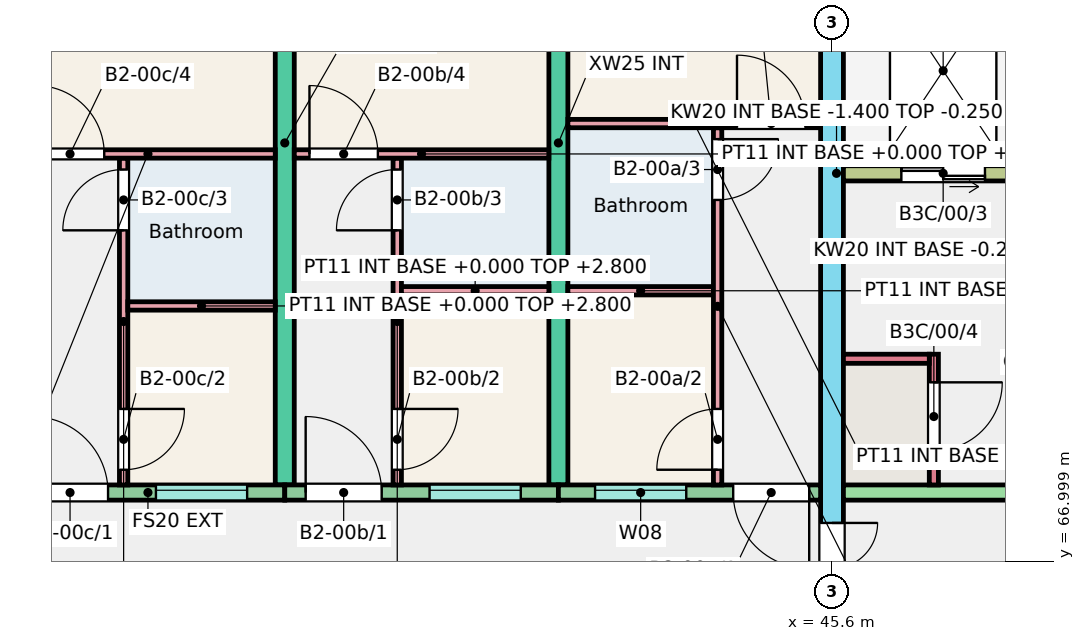
"""IFC4 building model, lengths in metres.
Left out: names, types, materials, properties, quantities, classifications, styles, units other than length and angle.
Written with IfcOpenShell. Run it as: python <this file> out.ifc"""

import sys

from ifc_helpers import new_model, si_unit, direction, frame, frame_2d, origin, place, context, subcontext, project, spatial, rectangle, extrude, element, fill, save


model = new_model("IFC4")
c1 = context("Model", 3, precision=1e-05, world=origin(), true_north=direction((0.0, 1.0)))
c2 = subcontext(c1, "Body", "Model", "MODEL_VIEW")
j1 = project(units=[si_unit("LENGTHUNIT", "METRE"), si_unit("PLANEANGLEUNIT", "RADIAN")], contexts=[c1])
p1 = place(None, origin())
s1 = spatial("IfcSite", under=j1, at=p1, CompositionType="ELEMENT")
p2 = place(p1, origin())
s2 = spatial("IfcBuilding", under=s1, at=p2, CompositionType="ELEMENT")
p3 = place(p2, origin())
s3 = spatial("IfcBuildingStorey", under=s2, at=p3, CompositionType="ELEMENT", Elevation=0.0)
for number, where, z_axis, x_axis in (
    (1, (38.4, 68.0, -0.25), (0.0, 0.0, 1.0), (0.0, 1.0, 0.0)),
    (2, (42.0, 68.0, -0.25), (0.0, 0.0, 1.0), (0.0, 1.0, 0.0)),
):
    element("IfcWall", number, at=place(p3, frame(where, z_axis=z_axis, x_axis=x_axis)), inside=s3, PredefinedType="SHEAR", context=c2, shape_type="SweptSolid", body=[
        extrude(rectangle(XDim=9.0, YDim=0.25, at=frame_2d((4.5, 0.0))), origin(), (0.0, 0.0, 1.0), 3.25),
    ])
p4 = place(p3, frame((45.6, 66.0, -0.25), z_axis=(0.0, 0.0, 1.0), x_axis=(0.0, 1.0, 0.0)))
e3 = element("IfcWall", 3, at=p4, inside=s3, PredefinedType="SHEAR", context=c2, shape_type="SweptSolid", body=[
    extrude(rectangle(XDim=11.0, YDim=0.3, at=frame_2d((5.5, 0.0))), origin(), (0.0, 0.0, 1.0), 3.25),
])
p5 = place(p4, frame((0.3, 0.0, 0.25)))
e4 = element("IfcOpeningElement", 4, at=p5, cuts=e3, PredefinedType="OPENING", context=c2, shape_type="SweptSolid", body=[
    extrude(rectangle(XDim=1.2, YDim=2.1, at=frame_2d((0.6, 1.05))), frame((0.0, 0.16, 0.0), z_axis=(0.0, -1.0, 0.0), x_axis=(1.0, 0.0, 0.0)), (0.0, 0.0, 1.0), 0.32),
])
p6 = place(p3, frame((34.8, 67.9, -0.25), z_axis=(0.0, 0.0, 1.0), x_axis=(1.0, 0.0, 0.0)))
e5 = element("IfcWall", 5, at=p6, inside=s3, PredefinedType="SOLIDWALL", context=c2, shape_type="SweptSolid", body=[
    extrude(rectangle(XDim=3.6, YDim=0.2, at=frame_2d((1.8, 0.0))), origin(), (0.0, 0.0, 1.0), 3.25),
])
p7 = place(p6, frame((1.905, 0.0, 1.35)))
e6 = element("IfcOpeningElement", 6, at=p7, cuts=e5, PredefinedType="OPENING", context=c2, shape_type="SweptSolid", body=[
    extrude(rectangle(XDim=1.2, YDim=1.3, at=frame_2d((0.6, 0.65))), frame((0.0, 0.11, 0.0), z_axis=(0.0, -1.0, 0.0), x_axis=(1.0, 0.0, 0.0)), (0.0, 0.0, 1.0), 0.22),
])
p8 = place(p6, frame((0.275, 0.0, 0.25)))
e7 = element("IfcOpeningElement", 7, at=p8, cuts=e5, PredefinedType="OPENING", context=c2, shape_type="SweptSolid", body=[
    extrude(rectangle(XDim=1.0, YDim=2.1, at=frame_2d((0.5, 1.05))), frame((0.0, 0.11, 0.0), z_axis=(0.0, -1.0, 0.0), x_axis=(1.0, 0.0, 0.0)), (0.0, 0.0, 1.0), 0.22),
])
p9 = place(p3, frame((38.4, 67.9, -0.25), z_axis=(0.0, 0.0, 1.0), x_axis=(1.0, 0.0, 0.0)))
e8 = element("IfcWall", 8, at=p9, inside=s3, PredefinedType="SOLIDWALL", context=c2, shape_type="SweptSolid", body=[
    extrude(rectangle(XDim=3.6, YDim=0.2, at=frame_2d((1.8, 0.0))), origin(), (0.0, 0.0, 1.0), 3.25),
])
p10 = place(p9, frame((1.905, 0.0, 1.35)))
e9 = element("IfcOpeningElement", 9, at=p10, cuts=e8, PredefinedType="OPENING", context=c2, shape_type="SweptSolid", body=[
    extrude(rectangle(XDim=1.2, YDim=1.3, at=frame_2d((0.6, 0.65))), frame((0.0, 0.11, 0.0), z_axis=(0.0, -1.0, 0.0), x_axis=(1.0, 0.0, 0.0)), (0.0, 0.0, 1.0), 0.22),
])
p11 = place(p9, frame((0.275, 0.0, 0.25)))
e10 = element("IfcOpeningElement", 10, at=p11, cuts=e8, PredefinedType="OPENING", context=c2, shape_type="SweptSolid", body=[
    extrude(rectangle(XDim=1.0, YDim=2.1, at=frame_2d((0.5, 1.05))), frame((0.0, 0.11, 0.0), z_axis=(0.0, -1.0, 0.0), x_axis=(1.0, 0.0, 0.0)), (0.0, 0.0, 1.0), 0.22),
])
p12 = place(p3, frame((42.0, 67.9, -0.25), z_axis=(0.0, 0.0, 1.0), x_axis=(1.0, 0.0, 0.0)))
e11 = element("IfcWall", 11, at=p12, inside=s3, PredefinedType="SOLIDWALL", context=c2, shape_type="SweptSolid", body=[
    extrude(rectangle(XDim=3.45, YDim=0.2, at=frame_2d((1.725, 0.0))), origin(), (0.0, 0.0, 1.0), 3.25),
])
p13 = place(p12, frame((0.482, 0.0, 1.35)))
e12 = element("IfcOpeningElement", 12, at=p13, cuts=e11, PredefinedType="OPENING", context=c2, shape_type="SweptSolid", body=[
    extrude(rectangle(XDim=1.2, YDim=1.3, at=frame_2d((0.6, 0.65))), frame((0.0, 0.11, 0.0), z_axis=(0.0, -1.0, 0.0), x_axis=(1.0, 0.0, 0.0)), (0.0, 0.0, 1.0), 0.22),
])
p14 = place(p12, frame((2.3, 0.0, 0.25)))
e13 = element("IfcOpeningElement", 13, at=p14, cuts=e11, PredefinedType="OPENING", context=c2, shape_type="SweptSolid", body=[
    extrude(rectangle(XDim=1.0, YDim=2.1, at=frame_2d((0.5, 1.05))), frame((0.0, 0.11, 0.0), z_axis=(0.0, -1.0, 0.0), x_axis=(1.0, 0.0, 0.0)), (0.0, 0.0, 1.0), 0.22),
])
p15 = place(p3, frame((45.75, 67.9, -0.25), z_axis=(0.0, 0.0, 1.0), x_axis=(1.0, 0.0, 0.0)))
e14 = element("IfcWall", 14, at=p15, inside=s3, PredefinedType="SHEAR", context=c2, shape_type="SweptSolid", body=[
    extrude(rectangle(XDim=5.85, YDim=0.2, at=frame_2d((2.925, 0.0))), origin(), (0.0, 0.0, 1.0), 3.25),
])
p16 = place(p15, frame((2.312, 0.0, 0.25)))
e15 = element("IfcOpeningElement", 15, at=p16, cuts=e14, PredefinedType="OPENING", context=c2, shape_type="SweptSolid", body=[
    extrude(rectangle(XDim=1.1, YDim=2.1, at=frame_2d((0.55, 1.05))), frame((0.0, 0.11, 0.0), z_axis=(0.0, -1.0, 0.0), x_axis=(1.0, 0.0, 0.0)), (0.0, 0.0, 1.0), 0.22),
])
p17 = place(p3, frame((45.75, 72.1, -0.25), z_axis=(0.0, 0.0, 1.0), x_axis=(1.0, 0.0, 0.0)))
e16 = element("IfcWall", 16, at=p17, inside=s3, PredefinedType="SHEAR", context=c2, shape_type="SweptSolid", body=[
    extrude(rectangle(XDim=5.725, YDim=0.2, at=frame_2d((2.863, 0.0))), origin(), (0.0, 0.0, 1.0), 3.25),
])
p18 = place(p17, frame((3.775, 0.0, 0.25)))
e17 = element("IfcOpeningElement", 17, at=p18, cuts=e16, PredefinedType="OPENING", context=c2, shape_type="SweptSolid", body=[
    extrude(rectangle(XDim=1.0, YDim=2.1, at=frame_2d((0.5, 1.05))), frame((0.0, 0.11, 0.0), z_axis=(0.0, -1.0, 0.0), x_axis=(1.0, 0.0, 0.0)), (0.0, 0.0, 1.0), 0.22),
])
p19 = place(p17, frame((0.762, 0.0, 0.25)))
e18 = element("IfcOpeningElement", 18, at=p19, cuts=e16, PredefinedType="OPENING", context=c2, shape_type="SweptSolid", body=[
    extrude(rectangle(XDim=1.1, YDim=2.1, at=frame_2d((0.55, 1.05))), frame((0.0, 0.11, 0.0), z_axis=(0.0, -1.0, 0.0), x_axis=(1.0, 0.0, 0.0)), (0.0, 0.0, 1.0), 0.22),
])
p20 = place(p3, frame((46.94, 68.0, -0.25), z_axis=(0.0, 0.0, 1.0), x_axis=(0.0, 1.0, 0.0)))
e19 = element("IfcWall", 19, at=p20, inside=s3, PredefinedType="SHEAR", context=c2, shape_type="SweptSolid", body=[
    extrude(rectangle(XDim=1.72, YDim=0.12, at=frame_2d((0.86, 0.0))), origin(), (0.0, 0.0, 1.0), 3.25),
])
p21 = place(p20, frame((0.45, 0.0, 0.25)))
e20 = element("IfcOpeningElement", 20, at=p21, cuts=e19, PredefinedType="OPENING", context=c2, shape_type="SweptSolid", body=[
    extrude(rectangle(XDim=0.9, YDim=2.1, at=frame_2d((0.45, 1.05))), frame((0.0, 0.07, 0.0), z_axis=(0.0, -1.0, 0.0), x_axis=(1.0, 0.0, 0.0)), (0.0, 0.0, 1.0), 0.14),
])
p22 = place(p3, frame((45.75, 69.66, -0.25), z_axis=(0.0, 0.0, 1.0), x_axis=(1.0, 0.0, 0.0)))
e21 = element("IfcWall", 21, at=p22, inside=s3, PredefinedType="SHEAR", context=c2, shape_type="SweptSolid", body=[
    extrude(rectangle(XDim=1.13, YDim=0.12, at=frame_2d((0.565, 0.0))), origin(), (0.0, 0.0, 1.0), 3.25),
])
p23 = place(p3, frame((45.6, 72.1, -1.4), z_axis=(0.0, 0.0, 1.0), x_axis=(1.0, 0.0, 0.0)))
e22 = element("IfcWall", 22, at=p23, inside=s3, PredefinedType="SHEAR", context=c2, shape_type="SweptSolid", body=[
    extrude(rectangle(XDim=2.975, YDim=0.2, at=frame_2d((1.487, 0.0))), origin(), (0.0, 0.0, 1.0), 1.15),
])
p24 = place(p3, frame((45.675, 72.2, -1.4), z_axis=(0.0, 0.0, 1.0), x_axis=(0.0, 1.0, 0.0)))
e23 = element("IfcWall", 23, at=p24, inside=s3, PredefinedType="SHEAR", context=c2, shape_type="SweptSolid", body=[
    extrude(rectangle(XDim=3.0, YDim=0.15, at=frame_2d((1.5, 0.0))), origin(), (0.0, 0.0, 1.0), 1.15),
])
p25 = place(p3, frame((42.125, 70.555, 0.0), z_axis=(0.0, 0.0, 1.0), x_axis=(1.0, 0.0, 0.0)))
e24 = element("IfcWall", 24, at=p25, inside=s3, PredefinedType="PARTITIONING", context=c2, shape_type="SweptSolid", body=[
    extrude(rectangle(XDim=1.915, YDim=0.11, at=frame_2d((0.958, 0.0))), origin(), (0.0, 0.0, 1.0), 2.8),
])
p26 = place(p3, frame((44.095, 68.0, 0.0), z_axis=(0.0, 0.0, 1.0), x_axis=(0.0, 1.0, 0.0)))
e25 = element("IfcWall", 25, at=p26, inside=s3, PredefinedType="PARTITIONING", context=c2, shape_type="SweptSolid", body=[
    extrude(rectangle(XDim=4.7, YDim=0.11, at=frame_2d((2.35, 0.0))), origin(), (0.0, 0.0, 1.0), 2.8),
])
p27 = place(p26, frame((0.2, 0.0, 0.0)))
e26 = element("IfcOpeningElement", 26, at=p27, cuts=e25, PredefinedType="OPENING", context=c2, shape_type="SweptSolid", body=[
    extrude(rectangle(XDim=0.8, YDim=2.1, at=frame_2d((0.4, 1.05))), frame((0.0, 0.065, 0.0), z_axis=(0.0, -1.0, 0.0), x_axis=(1.0, 0.0, 0.0)), (0.0, 0.0, 1.0), 0.13),
])
p28 = place(p26, frame((3.75, 0.0, 0.0)))
e27 = element("IfcOpeningElement", 27, at=p28, cuts=e25, PredefinedType="OPENING", context=c2, shape_type="SweptSolid", body=[
    extrude(rectangle(XDim=0.8, YDim=2.1, at=frame_2d((0.4, 1.05))), frame((0.0, 0.065, 0.0), z_axis=(0.0, -1.0, 0.0), x_axis=(1.0, 0.0, 0.0)), (0.0, 0.0, 1.0), 0.13),
])
p29 = place(p3, frame((42.125, 72.755, 0.0), z_axis=(0.0, 0.0, 1.0), x_axis=(1.0, 0.0, 0.0)))
e28 = element("IfcWall", 28, at=p29, inside=s3, PredefinedType="PARTITIONING", context=c2, shape_type="SweptSolid", body=[
    extrude(rectangle(XDim=3.325, YDim=0.11, at=frame_2d((1.663, 0.0))), origin(), (0.0, 0.0, 1.0), 2.8),
])
p30 = place(p29, frame((2.225, 0.0, 0.0)))
e29 = element("IfcOpeningElement", 29, at=p30, cuts=e28, PredefinedType="OPENING", context=c2, shape_type="SweptSolid", body=[
    extrude(rectangle(XDim=0.9, YDim=2.1, at=frame_2d((0.45, 1.05))), frame((0.0, 0.065, 0.0), z_axis=(0.0, -1.0, 0.0), x_axis=(1.0, 0.0, 0.0)), (0.0, 0.0, 1.0), 0.13),
])
p31 = place(p3, frame((39.88, 68.0, 0.0), z_axis=(0.0, 0.0, 1.0), x_axis=(0.0, 1.0, 0.0)))
e30 = element("IfcWall", 30, at=p31, inside=s3, PredefinedType="PARTITIONING", context=c2, shape_type="SweptSolid", body=[
    extrude(rectangle(XDim=4.3, YDim=0.11, at=frame_2d((2.15, 0.0))), origin(), (0.0, 0.0, 1.0), 2.8),
])
p32 = place(p31, frame((0.2, 0.0, 0.0)))
e31 = element("IfcOpeningElement", 31, at=p32, cuts=e30, PredefinedType="OPENING", context=c2, shape_type="SweptSolid", body=[
    extrude(rectangle(XDim=0.8, YDim=2.1, at=frame_2d((0.4, 1.05))), frame((0.0, 0.065, 0.0), z_axis=(0.0, -1.0, 0.0), x_axis=(1.0, 0.0, 0.0)), (0.0, 0.0, 1.0), 0.13),
])
p33 = place(p31, frame((3.35, 0.0, 0.0)))
e32 = element("IfcOpeningElement", 32, at=p33, cuts=e30, PredefinedType="OPENING", context=c2, shape_type="SweptSolid", body=[
    extrude(rectangle(XDim=0.8, YDim=2.1, at=frame_2d((0.4, 1.05))), frame((0.0, 0.065, 0.0), z_axis=(0.0, -1.0, 0.0), x_axis=(1.0, 0.0, 0.0)), (0.0, 0.0, 1.0), 0.13),
])
p34 = place(p3, frame((39.935, 70.555, 0.0), z_axis=(0.0, 0.0, 1.0), x_axis=(1.0, 0.0, 0.0)))
e33 = element("IfcWall", 33, at=p34, inside=s3, PredefinedType="PARTITIONING", context=c2, shape_type="SweptSolid", body=[
    extrude(rectangle(XDim=1.94, YDim=0.11, at=frame_2d((0.97, 0.0))), origin(), (0.0, 0.0, 1.0), 2.8),
])
p35 = place(p3, frame((38.525, 72.355, 0.0), z_axis=(0.0, 0.0, 1.0), x_axis=(1.0, 0.0, 0.0)))
e34 = element("IfcWall", 34, at=p35, inside=s3, PredefinedType="PARTITIONING", context=c2, shape_type="SweptSolid", body=[
    extrude(rectangle(XDim=3.35, YDim=0.11, at=frame_2d((1.675, 0.0))), origin(), (0.0, 0.0, 1.0), 2.8),
])
p36 = place(p35, frame((0.2, 0.0, 0.0)))
e35 = element("IfcOpeningElement", 35, at=p36, cuts=e34, PredefinedType="OPENING", context=c2, shape_type="SweptSolid", body=[
    extrude(rectangle(XDim=0.9, YDim=2.1, at=frame_2d((0.45, 1.05))), frame((0.0, 0.065, 0.0), z_axis=(0.0, -1.0, 0.0), x_axis=(1.0, 0.0, 0.0)), (0.0, 0.0, 1.0), 0.13),
])
p37 = place(p3, frame((36.28, 68.0, 0.0), z_axis=(0.0, 0.0, 1.0), x_axis=(0.0, 1.0, 0.0)))
e36 = element("IfcWall", 36, at=p37, inside=s3, PredefinedType="PARTITIONING", context=c2, shape_type="SweptSolid", body=[
    extrude(rectangle(XDim=4.3, YDim=0.11, at=frame_2d((2.15, 0.0))), origin(), (0.0, 0.0, 1.0), 2.8),
])
p38 = place(p37, frame((0.2, 0.0, 0.0)))
e37 = element("IfcOpeningElement", 37, at=p38, cuts=e36, PredefinedType="OPENING", context=c2, shape_type="SweptSolid", body=[
    extrude(rectangle(XDim=0.8, YDim=2.1, at=frame_2d((0.4, 1.05))), frame((0.0, 0.065, 0.0), z_axis=(0.0, -1.0, 0.0), x_axis=(1.0, 0.0, 0.0)), (0.0, 0.0, 1.0), 0.13),
])
p39 = place(p37, frame((3.35, 0.0, 0.0)))
e38 = element("IfcOpeningElement", 38, at=p39, cuts=e36, PredefinedType="OPENING", context=c2, shape_type="SweptSolid", body=[
    extrude(rectangle(XDim=0.8, YDim=2.1, at=frame_2d((0.4, 1.05))), frame((0.0, 0.065, 0.0), z_axis=(0.0, -1.0, 0.0), x_axis=(1.0, 0.0, 0.0)), (0.0, 0.0, 1.0), 0.13),
])
p40 = place(p3, frame((36.335, 70.355, 0.0), z_axis=(0.0, 0.0, 1.0), x_axis=(1.0, 0.0, 0.0)))
e39 = element("IfcWall", 39, at=p40, inside=s3, PredefinedType="PARTITIONING", context=c2, shape_type="SweptSolid", body=[
    extrude(rectangle(XDim=1.94, YDim=0.11, at=frame_2d((0.97, 0.0))), origin(), (0.0, 0.0, 1.0), 2.8),
])
p41 = place(p3, frame((34.925, 72.355, 0.0), z_axis=(0.0, 0.0, 1.0), x_axis=(1.0, 0.0, 0.0)))
e40 = element("IfcWall", 40, at=p41, inside=s3, PredefinedType="PARTITIONING", context=c2, shape_type="SweptSolid", body=[
    extrude(rectangle(XDim=3.35, YDim=0.11, at=frame_2d((1.675, 0.0))), origin(), (0.0, 0.0, 1.0), 2.8),
])
p42 = place(p41, frame((0.2, 0.0, 0.0)))
e41 = element("IfcOpeningElement", 41, at=p42, cuts=e40, PredefinedType="OPENING", context=c2, shape_type="SweptSolid", body=[
    extrude(rectangle(XDim=0.9, YDim=2.1, at=frame_2d((0.45, 1.05))), frame((0.0, 0.065, 0.0), z_axis=(0.0, -1.0, 0.0), x_axis=(1.0, 0.0, 0.0)), (0.0, 0.0, 1.0), 0.13),
])
p43 = place(p13, origin())
e42 = element("IfcWindow", 42, at=p43, inside=s3, PartitioningType="SINGLE_PANEL", PredefinedType="WINDOW", context=c2, shape_type="SweptSolid", body=[
    extrude(rectangle(XDim=1.2, YDim=1.3, at=frame_2d((0.6, 0.65))), frame((0.0, 0.06, 0.0), z_axis=(0.0, -1.0, 0.0), x_axis=(1.0, 0.0, 0.0)), (0.0, 0.0, 1.0), 0.06),
])
fill(e12, e42)
p44 = place(p10, origin())
e43 = element("IfcWindow", 43, at=p44, inside=s3, PartitioningType="SINGLE_PANEL", PredefinedType="WINDOW", context=c2, shape_type="SweptSolid", body=[
    extrude(rectangle(XDim=1.2, YDim=1.3, at=frame_2d((0.6, 0.65))), frame((0.0, 0.06, 0.0), z_axis=(0.0, -1.0, 0.0), x_axis=(1.0, 0.0, 0.0)), (0.0, 0.0, 1.0), 0.06),
])
fill(e9, e43)
p45 = place(p7, origin())
e44 = element("IfcWindow", 44, at=p45, inside=s3, PartitioningType="SINGLE_PANEL", PredefinedType="WINDOW", context=c2, shape_type="SweptSolid", body=[
    extrude(rectangle(XDim=1.2, YDim=1.3, at=frame_2d((0.6, 0.65))), frame((0.0, 0.06, 0.0), z_axis=(0.0, -1.0, 0.0), x_axis=(1.0, 0.0, 0.0)), (0.0, 0.0, 1.0), 0.06),
])
fill(e6, e44)
p46 = place(p14, origin())
e45 = element("IfcDoor", 45, at=p46, inside=s3, OperationType="SINGLE_SWING_RIGHT", PredefinedType="DOOR", context=c2, shape_type="SweptSolid", body=[
    extrude(rectangle(XDim=1.0, YDim=2.1, at=frame_2d((0.5, 1.05))), frame((0.0, 0.025, 0.0), z_axis=(0.0, -1.0, 0.0), x_axis=(1.0, 0.0, 0.0)), (0.0, 0.0, 1.0), 0.05),
])
fill(e13, e45)
p47 = place(p27, origin())
e46 = element("IfcDoor", 46, at=p47, inside=s3, OperationType="SINGLE_SWING_LEFT", PredefinedType="DOOR", context=c2, shape_type="SweptSolid", body=[
    extrude(rectangle(XDim=0.8, YDim=2.1, at=frame_2d((0.4, 1.05))), frame((0.0, 0.025, 0.0), z_axis=(0.0, -1.0, 0.0), x_axis=(1.0, 0.0, 0.0)), (0.0, 0.0, 1.0), 0.05),
])
fill(e26, e46)
p48 = place(p28, origin())
e47 = element("IfcDoor", 47, at=p48, inside=s3, OperationType="SINGLE_SWING_RIGHT", PredefinedType="DOOR", context=c2, shape_type="SweptSolid", body=[
    extrude(rectangle(XDim=0.8, YDim=2.1, at=frame_2d((0.4, 1.05))), frame((0.0, 0.025, 0.0), z_axis=(0.0, -1.0, 0.0), x_axis=(1.0, 0.0, 0.0)), (0.0, 0.0, 1.0), 0.05),
])
fill(e27, e47)
p49 = place(p30, origin())
e48 = element("IfcDoor", 48, at=p49, inside=s3, OperationType="SINGLE_SWING_LEFT", PredefinedType="DOOR", context=c2, shape_type="SweptSolid", body=[
    extrude(rectangle(XDim=0.9, YDim=2.1, at=frame_2d((0.45, 1.05))), frame((0.0, 0.025, 0.0), z_axis=(0.0, -1.0, 0.0), x_axis=(1.0, 0.0, 0.0)), (0.0, 0.0, 1.0), 0.05),
])
fill(e29, e48)
p50 = place(p11, origin())
e49 = element("IfcDoor", 49, at=p50, inside=s3, OperationType="SINGLE_SWING_LEFT", PredefinedType="DOOR", context=c2, shape_type="SweptSolid", body=[
    extrude(rectangle(XDim=1.0, YDim=2.1, at=frame_2d((0.5, 1.05))), frame((0.0, 0.025, 0.0), z_axis=(0.0, -1.0, 0.0), x_axis=(1.0, 0.0, 0.0)), (0.0, 0.0, 1.0), 0.05),
])
fill(e10, e49)
p51 = place(p32, origin())
e50 = element("IfcDoor", 50, at=p51, inside=s3, OperationType="SINGLE_SWING_RIGHT", PredefinedType="DOOR", context=c2, shape_type="SweptSolid", body=[
    extrude(rectangle(XDim=0.8, YDim=2.1, at=frame_2d((0.4, 1.05))), frame((0.0, 0.025, 0.0), z_axis=(0.0, -1.0, 0.0), x_axis=(1.0, 0.0, 0.0)), (0.0, 0.0, 1.0), 0.05),
])
fill(e31, e50)
p52 = place(p33, origin())
e51 = element("IfcDoor", 51, at=p52, inside=s3, OperationType="SINGLE_SWING_LEFT", PredefinedType="DOOR", context=c2, shape_type="SweptSolid", body=[
    extrude(rectangle(XDim=0.8, YDim=2.1, at=frame_2d((0.4, 1.05))), frame((0.0, 0.025, 0.0), z_axis=(0.0, -1.0, 0.0), x_axis=(1.0, 0.0, 0.0)), (0.0, 0.0, 1.0), 0.05),
])
fill(e32, e51)
p53 = place(p36, origin())
e52 = element("IfcDoor", 52, at=p53, inside=s3, OperationType="SINGLE_SWING_LEFT", PredefinedType="DOOR", context=c2, shape_type="SweptSolid", body=[
    extrude(rectangle(XDim=0.9, YDim=2.1, at=frame_2d((0.45, 1.05))), frame((0.0, 0.025, 0.0), z_axis=(0.0, -1.0, 0.0), x_axis=(1.0, 0.0, 0.0)), (0.0, 0.0, 1.0), 0.05),
])
fill(e35, e52)
p54 = place(p8, origin())
e53 = element("IfcDoor", 53, at=p54, inside=s3, OperationType="SINGLE_SWING_LEFT", PredefinedType="DOOR", context=c2, shape_type="SweptSolid", body=[
    extrude(rectangle(XDim=1.0, YDim=2.1, at=frame_2d((0.5, 1.05))), frame((0.0, 0.025, 0.0), z_axis=(0.0, -1.0, 0.0), x_axis=(1.0, 0.0, 0.0)), (0.0, 0.0, 1.0), 0.05),
])
fill(e7, e53)
p55 = place(p38, origin())
e54 = element("IfcDoor", 54, at=p55, inside=s3, OperationType="SINGLE_SWING_RIGHT", PredefinedType="DOOR", context=c2, shape_type="SweptSolid", body=[
    extrude(rectangle(XDim=0.8, YDim=2.1, at=frame_2d((0.4, 1.05))), frame((0.0, 0.025, 0.0), z_axis=(0.0, -1.0, 0.0), x_axis=(1.0, 0.0, 0.0)), (0.0, 0.0, 1.0), 0.05),
])
fill(e37, e54)
p56 = place(p39, origin())
e55 = element("IfcDoor", 55, at=p56, inside=s3, OperationType="SINGLE_SWING_LEFT", PredefinedType="DOOR", context=c2, shape_type="SweptSolid", body=[
    extrude(rectangle(XDim=0.8, YDim=2.1, at=frame_2d((0.4, 1.05))), frame((0.0, 0.025, 0.0), z_axis=(0.0, -1.0, 0.0), x_axis=(1.0, 0.0, 0.0)), (0.0, 0.0, 1.0), 0.05),
])
fill(e38, e55)
p57 = place(p42, origin())
e56 = element("IfcDoor", 56, at=p57, inside=s3, OperationType="SINGLE_SWING_LEFT", PredefinedType="DOOR", context=c2, shape_type="SweptSolid", body=[
    extrude(rectangle(XDim=0.9, YDim=2.1, at=frame_2d((0.45, 1.05))), frame((0.0, 0.025, 0.0), z_axis=(0.0, -1.0, 0.0), x_axis=(1.0, 0.0, 0.0)), (0.0, 0.0, 1.0), 0.05),
])
fill(e41, e56)
p58 = place(p19, origin())
e57 = element("IfcDoor", 57, at=p58, inside=s3, OperationType="DOUBLE_DOOR_SLIDING", PredefinedType="DOOR", context=c2, shape_type="SweptSolid", body=[
    extrude(rectangle(XDim=1.1, YDim=2.1, at=frame_2d((0.55, 1.05))), frame((0.0, 0.025, 0.0), z_axis=(0.0, -1.0, 0.0), x_axis=(1.0, 0.0, 0.0)), (0.0, 0.0, 1.0), 0.05),
])
fill(e18, e57)
p59 = place(p21, origin())
e58 = element("IfcDoor", 58, at=p59, inside=s3, OperationType="SINGLE_SWING_RIGHT", PredefinedType="DOOR", context=c2, shape_type="SweptSolid", body=[
    extrude(rectangle(XDim=0.9, YDim=2.1, at=frame_2d((0.45, 1.05))), frame((0.0, 0.025, 0.0), z_axis=(0.0, -1.0, 0.0), x_axis=(1.0, 0.0, 0.0)), (0.0, 0.0, 1.0), 0.05),
])
fill(e20, e58)
p60 = place(p5, origin())
e59 = element("IfcDoor", 59, at=p60, inside=s3, OperationType="DOUBLE_DOOR_SINGLE_SWING", PredefinedType="DOOR", context=c2, shape_type="SweptSolid", body=[
    extrude(rectangle(XDim=1.2, YDim=2.1, at=frame_2d((0.6, 1.05))), frame((0.0, 0.025, 0.0), z_axis=(0.0, -1.0, 0.0), x_axis=(1.0, 0.0, 0.0)), (0.0, 0.0, 1.0), 0.05),
])
fill(e4, e59)
save(model, sys.argv[1])
